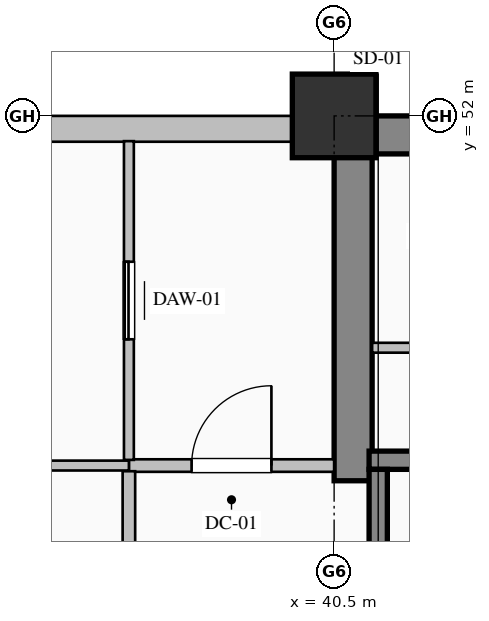
"""IFC4 building model, lengths in metres.
Left out: names, types, materials, properties, quantities, classifications, styles, units other than length and angle.
Written with IfcOpenShell. Run it as: python <this file> out.ifc"""

import sys

from ifc_helpers import new_model, si_unit, direction, frame, frame_2d, origin, origin_2d, place, context, subcontext, project, spatial, rectangle, hollow_rectangle, extrude, element, fill, save


model = new_model("IFC4")
c1 = context("Model", 3, precision=1e-05, world=origin(), true_north=direction((0.0, 1.0)))
c2 = subcontext(c1, "Body", "Model", "MODEL_VIEW")
j1 = project(units=[si_unit("LENGTHUNIT", "METRE"), si_unit("PLANEANGLEUNIT", "RADIAN")], contexts=[c1])
p1 = place(None, origin())
s1 = spatial("IfcSite", under=j1, at=p1, CompositionType="ELEMENT")
p2 = place(p1, origin())
s2 = spatial("IfcBuilding", under=s1, at=p2, CompositionType="ELEMENT")
p3 = place(p2, frame((0.0, 0.0, 139.0)))
s3 = spatial("IfcBuildingStorey", under=s2, at=p3, CompositionType="ELEMENT", Elevation=139.0)
p4 = place(p3, frame((40.5, 51.75, 0.0), z_axis=(0.0, 0.0, 1.0), x_axis=(1.0, 0.0, 0.0)))
e1 = element("IfcWall", 1, at=p4, inside=s3, PredefinedType="SHEAR", context=c2, shape_type="SweptSolid", body=[
    extrude(rectangle(XDim=23.5, YDim=0.5, at=frame_2d((11.75, 0.0))), origin(), (0.0, 0.0, 1.0), 3.765),
])
p5 = place(p3, frame((40.75, 47.2, 0.0), z_axis=(0.0, 0.0, 1.0), x_axis=(0.0, 1.0, 0.0)))
e2 = element("IfcWall", 2, at=p5, inside=s3, PredefinedType="SHEAR", context=c2, shape_type="SweptSolid", body=[
    extrude(rectangle(XDim=4.3, YDim=0.5, at=frame_2d((2.15, 0.0))), origin(), (0.0, 0.0, 1.0), 3.765),
])
p6 = place(p3, frame((40.5, 52.0, 0.0), z_axis=(0.0, 0.0, 1.0), x_axis=(1.0, 0.0, 0.0)))
e3 = element("IfcColumn", 3, at=p6, inside=s3, PredefinedType="COLUMN", context=c2, shape_type="SweptSolid", body=[
    extrude(hollow_rectangle(XDim=1.1, YDim=1.1, WallThickness=0.04, at=origin_2d()), origin(), (0.0, 0.0, 1.0), 4.0),
])
p7 = place(p3, frame((13.0, 51.83, 0.0), z_axis=(0.0, 0.0, 1.0), x_axis=(1.0, 0.0, 0.0)))
e4 = element("IfcWall", 4, at=p7, inside=s3, PredefinedType="SOLIDWALL", context=c2, shape_type="SweptSolid", body=[
    extrude(rectangle(XDim=27.52, YDim=0.34, at=frame_2d((13.76, 0.0))), origin(), (0.0, 0.0, 1.0), 3.265),
])
p8 = place(p7, frame((6.45, 0.0, 0.85)))
e5 = element("IfcOpeningElement", 5, at=p8, cuts=e4, PredefinedType="OPENING", context=c2, shape_type="SweptSolid", body=[
    extrude(rectangle(XDim=1.5, YDim=1.95, at=frame_2d((0.75, 0.975))), frame((0.0, 0.18, 0.0), z_axis=(0.0, -1.0, 0.0), x_axis=(1.0, 0.0, 0.0)), (0.0, 0.0, 1.0), 0.36),
])
p9 = place(p7, frame((13.8, 0.0, 0.7)))
e6 = element("IfcOpeningElement", 6, at=p9, cuts=e4, PredefinedType="OPENING", context=c2, shape_type="SweptSolid", body=[
    extrude(rectangle(XDim=1.2, YDim=1.85, at=frame_2d((0.6, 0.925))), frame((0.0, 0.18, 0.0), z_axis=(0.0, -1.0, 0.0), x_axis=(1.0, 0.0, 0.0)), (0.0, 0.0, 1.0), 0.36),
])
p10 = place(p3, frame((40.96, 47.47, 0.0), z_axis=(0.0, 0.0, 1.0), x_axis=(1.0, 0.0, 0.0)))
e7 = element("IfcWall", 7, at=p10, inside=s3, PredefinedType="SOLIDWALL", context=c2, shape_type="SweptSolid", body=[
    extrude(rectangle(XDim=8.08, YDim=0.24, at=frame_2d((4.04, 0.0))), origin(), (0.0, 0.0, 1.0), 4.0),
])
p11 = place(p3, frame((41.08, 47.35, 0.0), z_axis=(0.0, 0.0, 1.0), x_axis=(0.0, -1.0, 0.0)))
e8 = element("IfcWall", 8, at=p11, inside=s3, PredefinedType="SOLIDWALL", context=c2, shape_type="SweptSolid", body=[
    extrude(rectangle(XDim=3.15, YDim=0.24, at=frame_2d((1.575, 0.0))), origin(), (0.0, 0.0, 1.0), 4.0),
])
p12 = place(p11, frame((1.0, 0.0, 0.0)))
e9 = element("IfcOpeningElement", 9, at=p12, cuts=e8, PredefinedType="OPENING", context=c2, shape_type="SweptSolid", body=[
    extrude(rectangle(XDim=1.15, YDim=2.2, at=frame_2d((0.575, 1.1))), frame((0.0, 0.13, 0.0), z_axis=(0.0, -1.0, 0.0), x_axis=(1.0, 0.0, 0.0)), (0.0, 0.0, 1.0), 0.26),
])
p13 = place(p3, frame((37.8, 47.4, 0.0), z_axis=(0.0, 0.0, 1.0), x_axis=(1.0, 0.0, 0.0)))
e10 = element("IfcWall", 10, at=p13, inside=s3, PredefinedType="PARTITIONING", context=c2, shape_type="SweptSolid", body=[
    extrude(rectangle(XDim=2.7, YDim=0.165, at=frame_2d((1.35, 0.0))), origin(), (0.0, 0.0, 1.0), 3.765),
])
p14 = place(p13, frame((0.825, 0.0, 0.0)))
e11 = element("IfcOpeningElement", 11, at=p14, cuts=e10, PredefinedType="OPENING", context=c2, shape_type="SweptSolid", body=[
    extrude(rectangle(XDim=1.05, YDim=2.15, at=frame_2d((0.525, 1.075))), frame((0.0, 0.093, 0.0), z_axis=(0.0, -1.0, 0.0), x_axis=(1.0, 0.0, 0.0)), (0.0, 0.0, 1.0), 0.185),
])
p15 = place(p3, frame((37.8, 44.274, 0.0), z_axis=(0.0, 0.0, 1.0), x_axis=(0.0, 1.0, 0.0)))
e12 = element("IfcWall", 12, at=p15, inside=s3, PredefinedType="PARTITIONING", context=c2, shape_type="SweptSolid", body=[
    extrude(rectangle(XDim=3.051, YDim=0.165, at=frame_2d((1.525, 0.0))), origin(), (0.0, 0.0, 1.0), 3.765),
])
p16 = place(p3, frame((37.8, 47.475, 0.0), z_axis=(0.0, 0.0, 1.0), x_axis=(0.0, 1.0, 0.0)))
e13 = element("IfcWall", 13, at=p16, inside=s3, PredefinedType="PARTITIONING", context=c2, shape_type="SweptSolid", body=[
    extrude(rectangle(XDim=4.193, YDim=0.13, at=frame_2d((2.097, 0.0))), origin(), (0.0, 0.0, 1.0), 3.765),
])
p17 = place(p16, frame((1.587, 0.0, 0.0)))
e14 = element("IfcOpeningElement", 14, at=p17, cuts=e13, PredefinedType="OPENING", context=c2, shape_type="SweptSolid", body=[
    extrude(rectangle(XDim=1.02, YDim=2.15, at=frame_2d((0.51, 1.075))), frame((0.0, 0.075, 0.0), z_axis=(0.0, -1.0, 0.0), x_axis=(1.0, 0.0, 0.0)), (0.0, 0.0, 1.0), 0.15),
])
p18 = place(p3, frame((37.8, 47.4, 0.0), z_axis=(0.0, 0.0, 1.0), x_axis=(-1.0, 0.0, 0.0)))
e15 = element("IfcWall", 15, at=p18, inside=s3, PredefinedType="PARTITIONING", context=c2, shape_type="SweptSolid", body=[
    extrude(rectangle(XDim=2.4, YDim=0.13, at=frame_2d((1.2, 0.0))), origin(), (0.0, 0.0, 1.0), 3.765),
])
p19 = place(p3, frame((41.0, 48.95, 0.0), z_axis=(0.0, 0.0, 1.0), x_axis=(1.0, 0.0, 0.0)))
e16 = element("IfcWall", 16, at=p19, inside=s3, PredefinedType="PARTITIONING", context=c2, shape_type="SweptSolid", body=[
    extrude(rectangle(XDim=2.8, YDim=0.13, at=frame_2d((1.4, 0.0))), origin(), (0.0, 0.0, 1.0), 3.765),
])
p20 = place(p19, frame((0.94, 0.0, 0.0)))
e17 = element("IfcOpeningElement", 17, at=p20, cuts=e16, PredefinedType="OPENING", context=c2, shape_type="SweptSolid", body=[
    extrude(rectangle(XDim=0.92, YDim=2.15, at=frame_2d((0.46, 1.075))), frame((0.0, 0.075, 0.0), z_axis=(0.0, -1.0, 0.0), x_axis=(1.0, 0.0, 0.0)), (0.0, 0.0, 1.0), 0.15),
])
p21 = place(p14, origin())
e18 = element("IfcDoor", 18, at=p21, inside=s3, OperationType="SINGLE_SWING_RIGHT", PredefinedType="DOOR", context=c2, shape_type="SweptSolid", body=[
    extrude(rectangle(XDim=1.05, YDim=2.15, at=frame_2d((0.525, 1.075))), frame((0.0, 0.025, 0.0), z_axis=(0.0, -1.0, 0.0), x_axis=(1.0, 0.0, 0.0)), (0.0, 0.0, 1.0), 0.05),
])
fill(e11, e18)
p22 = place(p17, origin())
e19 = element("IfcDoor", 19, at=p22, inside=s3, OperationType="SLIDING_TO_LEFT", PredefinedType="DOOR", context=c2, shape_type="SweptSolid", body=[
    extrude(rectangle(XDim=1.02, YDim=2.15, at=frame_2d((0.51, 1.075))), frame((0.0, 0.025, 0.0), z_axis=(0.0, -1.0, 0.0), x_axis=(1.0, 0.0, 0.0)), (0.0, 0.0, 1.0), 0.05),
])
fill(e14, e19)
save(model, sys.argv[1])
